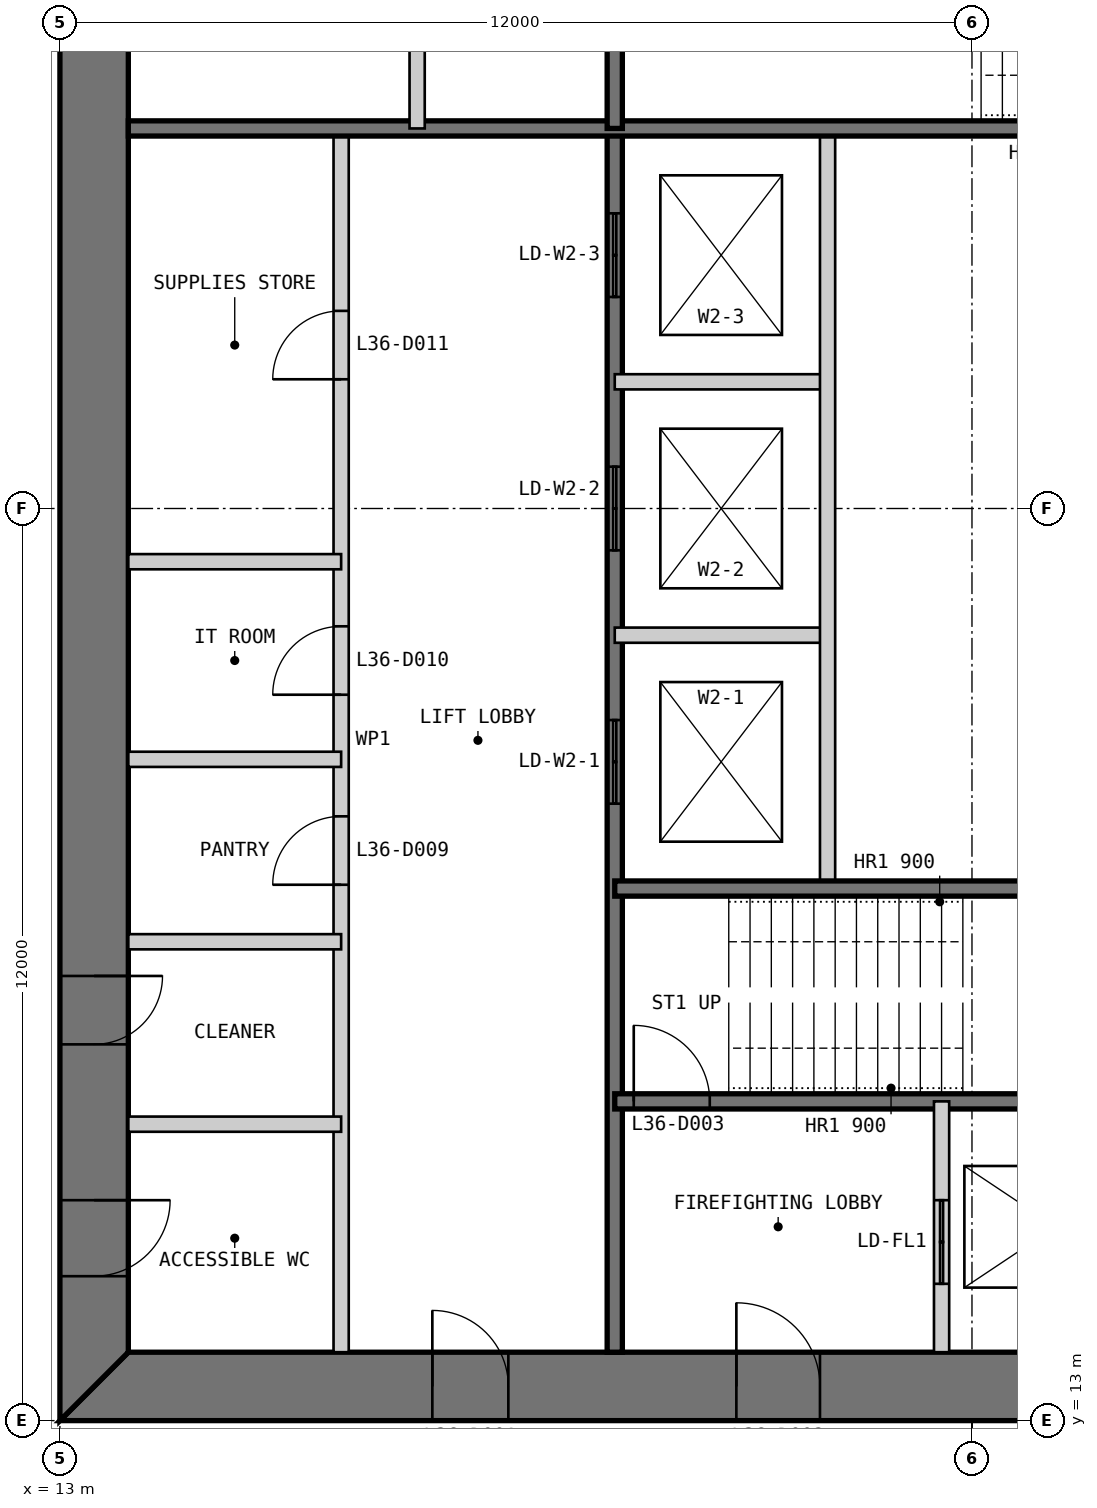
"""IFC4 building model, lengths in metres.
Left out: names, types, materials, properties, quantities, classifications, styles, units other than length and angle.
Written with IfcOpenShell. Run it as: python <this file> out.ifc"""

import sys

from ifc_helpers import new_model, si_unit, direction, frame, frame_2d, origin, place, context, subcontext, project, spatial, polyline, rectangle, outline, extrude, element, fill, save


model = new_model("IFC4")
c1 = context("Model", 3, precision=1e-05, world=origin(), true_north=direction((0.0, 1.0)))
c2 = subcontext(c1, "Body", "Model", "MODEL_VIEW")
j1 = project(units=[si_unit("LENGTHUNIT", "METRE"), si_unit("PLANEANGLEUNIT", "RADIAN")], contexts=[c1])
p1 = place(None, origin())
s1 = spatial("IfcSite", under=j1, at=p1, CompositionType="ELEMENT")
p2 = place(p1, origin())
s2 = spatial("IfcBuilding", under=s1, at=p2, CompositionType="ELEMENT")
p3 = place(p2, frame((0.0, 0.0, 154.4)))
s3 = spatial("IfcBuildingStorey", under=s2, at=p3, CompositionType="ELEMENT", Elevation=154.4)
p4 = place(p3, frame((13.0, 13.45, 0.0), z_axis=(0.0, 0.0, 1.0), x_axis=(1.0, 0.0, 0.0)))
e1 = element("IfcWall", 1, at=p4, inside=s3, PredefinedType="SHEAR", context=c2, shape_type="SweptSolid", body=[
    extrude(outline(polyline([(0.0, -0.45), (24.0, -0.45), (23.1, 0.45), (0.9, 0.45), (0.0, -0.45)])), origin(), (0.0, 0.0, 1.0), 4.0),
])
p5 = place(p4, frame((4.9, 0.0, 0.0)))
e2 = element("IfcOpeningElement", 2, at=p5, cuts=e1, PredefinedType="OPENING", context=c2, shape_type="SweptSolid", body=[
    extrude(rectangle(XDim=1.0, YDim=2.2, at=frame_2d((0.5, 1.1))), frame((0.0, 0.46, 0.0), z_axis=(0.0, -1.0, 0.0), x_axis=(1.0, 0.0, 0.0)), (0.0, 0.0, 1.0), 0.92),
])
p6 = place(p4, frame((8.9, 0.0, 0.0)))
e3 = element("IfcOpeningElement", 3, at=p6, cuts=e1, PredefinedType="OPENING", context=c2, shape_type="SweptSolid", body=[
    extrude(rectangle(XDim=1.1, YDim=2.2, at=frame_2d((0.55, 1.1))), frame((0.0, 0.46, 0.0), z_axis=(0.0, -1.0, 0.0), x_axis=(1.0, 0.0, 0.0)), (0.0, 0.0, 1.0), 0.92),
])
p7 = place(p4, frame((15.05, 0.0, 0.0)))
e4 = element("IfcOpeningElement", 4, at=p7, cuts=e1, PredefinedType="OPENING", context=c2, shape_type="SweptSolid", body=[
    extrude(rectangle(XDim=0.9, YDim=2.2, at=frame_2d((0.45, 1.1))), frame((0.0, 0.46, 0.0), z_axis=(0.0, -1.0, 0.0), x_axis=(1.0, 0.0, 0.0)), (0.0, 0.0, 1.0), 0.92),
])
p8 = place(p4, frame((17.9, 0.0, 0.0)))
e5 = element("IfcOpeningElement", 5, at=p8, cuts=e1, PredefinedType="OPENING", context=c2, shape_type="SweptSolid", body=[
    extrude(rectangle(XDim=1.0, YDim=2.2, at=frame_2d((0.5, 1.1))), frame((0.0, 0.46, 0.0), z_axis=(0.0, -1.0, 0.0), x_axis=(1.0, 0.0, 0.0)), (0.0, 0.0, 1.0), 0.92),
])
p9 = place(p4, frame((21.4, 0.0, 0.0)))
e6 = element("IfcOpeningElement", 6, at=p9, cuts=e1, PredefinedType="OPENING", context=c2, shape_type="SweptSolid", body=[
    extrude(rectangle(XDim=1.0, YDim=2.2, at=frame_2d((0.5, 1.1))), frame((0.0, 0.46, 0.0), z_axis=(0.0, -1.0, 0.0), x_axis=(1.0, 0.0, 0.0)), (0.0, 0.0, 1.0), 0.92),
])
p10 = place(p3, frame((13.45, 36.1, 0.0), z_axis=(0.0, 0.0, 1.0), x_axis=(0.0, -1.0, 0.0)))
e7 = element("IfcWall", 7, at=p10, inside=s3, PredefinedType="SHEAR", context=c2, shape_type="SweptSolid", body=[
    extrude(outline(polyline([(-0.9, -0.45), (23.1, -0.45), (22.2, 0.45), (0.0, 0.45), (-0.9, -0.45)])), origin(), (0.0, 0.0, 1.0), 4.0),
])
p11 = place(p10, frame((20.2, 0.0, 0.0)))
e8 = element("IfcOpeningElement", 8, at=p11, cuts=e7, PredefinedType="OPENING", context=c2, shape_type="SweptSolid", body=[
    extrude(rectangle(XDim=1.0, YDim=2.2, at=frame_2d((0.5, 1.1))), frame((0.0, 0.46, 0.0), z_axis=(0.0, -1.0, 0.0), x_axis=(1.0, 0.0, 0.0)), (0.0, 0.0, 1.0), 0.92),
])
p12 = place(p10, frame((17.25, 0.0, 0.0)))
e9 = element("IfcOpeningElement", 9, at=p12, cuts=e7, PredefinedType="OPENING", context=c2, shape_type="SweptSolid", body=[
    extrude(rectangle(XDim=0.9, YDim=2.2, at=frame_2d((0.45, 1.1))), frame((0.0, 0.46, 0.0), z_axis=(0.0, -1.0, 0.0), x_axis=(1.0, 0.0, 0.0)), (0.0, 0.0, 1.0), 0.92),
])
p13 = place(p3, frame((16.7, 13.9, 0.0), z_axis=(0.0, 0.0, 1.0), x_axis=(0.0, 1.0, 0.0)))
e10 = element("IfcWall", 10, at=p13, inside=s3, PredefinedType="PARTITIONING", context=c2, shape_type="SweptSolid", body=[
    extrude(rectangle(XDim=16.1, YDim=0.2, at=frame_2d((8.05, 0.0))), origin(), (0.0, 0.0, 1.0), 3.8),
])
p14 = place(p13, frame((6.15, 0.0, 0.0)))
e11 = element("IfcOpeningElement", 11, at=p14, cuts=e10, PredefinedType="OPENING", context=c2, shape_type="SweptSolid", body=[
    extrude(rectangle(XDim=0.9, YDim=2.2, at=frame_2d((0.45, 1.1))), frame((0.0, 0.11, 0.0), z_axis=(0.0, -1.0, 0.0), x_axis=(1.0, 0.0, 0.0)), (0.0, 0.0, 1.0), 0.22),
])
p15 = place(p13, frame((8.65, 0.0, 0.0)))
e12 = element("IfcOpeningElement", 12, at=p15, cuts=e10, PredefinedType="OPENING", context=c2, shape_type="SweptSolid", body=[
    extrude(rectangle(XDim=0.9, YDim=2.2, at=frame_2d((0.45, 1.1))), frame((0.0, 0.11, 0.0), z_axis=(0.0, -1.0, 0.0), x_axis=(1.0, 0.0, 0.0)), (0.0, 0.0, 1.0), 0.22),
])
p16 = place(p13, frame((12.8, 0.0, 0.0)))
e13 = element("IfcOpeningElement", 13, at=p16, cuts=e10, PredefinedType="OPENING", context=c2, shape_type="SweptSolid", body=[
    extrude(rectangle(XDim=0.9, YDim=2.2, at=frame_2d((0.45, 1.1))), frame((0.0, 0.11, 0.0), z_axis=(0.0, -1.0, 0.0), x_axis=(1.0, 0.0, 0.0)), (0.0, 0.0, 1.0), 0.22),
])
p17 = place(p3, frame((20.3, 13.9, 0.0), z_axis=(0.0, 0.0, 1.0), x_axis=(0.0, 1.0, 0.0)))
e14 = element("IfcWall", 14, at=p17, inside=s3, PredefinedType="SOLIDWALL", context=c2, shape_type="SweptSolid", body=[
    extrude(rectangle(XDim=16.1, YDim=0.2, at=frame_2d((8.05, 0.0))), origin(), (0.0, 0.0, 1.0), 3.8),
])
p18 = place(p17, frame((7.217, 0.0, 0.0)))
e15 = element("IfcOpeningElement", 15, at=p18, cuts=e14, PredefinedType="OPENING", context=c2, shape_type="SweptSolid", body=[
    extrude(rectangle(XDim=1.1, YDim=2.2, at=frame_2d((0.55, 1.1))), frame((0.0, 0.11, 0.0), z_axis=(0.0, -1.0, 0.0), x_axis=(1.0, 0.0, 0.0)), (0.0, 0.0, 1.0), 0.22),
])
p19 = place(p17, frame((10.55, 0.0, 0.0)))
e16 = element("IfcOpeningElement", 16, at=p19, cuts=e14, PredefinedType="OPENING", context=c2, shape_type="SweptSolid", body=[
    extrude(rectangle(XDim=1.1, YDim=2.2, at=frame_2d((0.55, 1.1))), frame((0.0, 0.11, 0.0), z_axis=(0.0, -1.0, 0.0), x_axis=(1.0, 0.0, 0.0)), (0.0, 0.0, 1.0), 0.22),
])
p20 = place(p17, frame((13.883, 0.0, 0.0)))
e17 = element("IfcOpeningElement", 17, at=p20, cuts=e14, PredefinedType="OPENING", context=c2, shape_type="SweptSolid", body=[
    extrude(rectangle(XDim=1.1, YDim=2.2, at=frame_2d((0.55, 1.1))), frame((0.0, 0.11, 0.0), z_axis=(0.0, -1.0, 0.0), x_axis=(1.0, 0.0, 0.0)), (0.0, 0.0, 1.0), 0.22),
])
for number, where, z_axis, x_axis in (
    (18, (20.3, 23.333, 0.0), (0.0, 0.0, 1.0), (1.0, 0.0, 0.0)),
    (19, (20.3, 26.667, 0.0), (0.0, 0.0, 1.0), (1.0, 0.0, 0.0)),
):
    element("IfcWall", number, at=place(p3, frame(where, z_axis=z_axis, x_axis=x_axis)), inside=s3, PredefinedType="PARTITIONING", context=c2, shape_type="SweptSolid", body=[
        extrude(rectangle(XDim=2.8, YDim=0.2, at=frame_2d((1.4, 0.0))), origin(), (0.0, 0.0, 1.0), 3.8),
    ])
p21 = place(p3, frame((23.1, 20.0, 0.0), z_axis=(0.0, 0.0, 1.0), x_axis=(0.0, 1.0, 0.0)))
e20 = element("IfcWall", 20, at=p21, inside=s3, PredefinedType="PARTITIONING", context=c2, shape_type="SweptSolid", body=[
    extrude(rectangle(XDim=10.0, YDim=0.2, at=frame_2d((5.0, 0.0))), origin(), (0.0, 0.0, 1.0), 3.8),
])
p22 = place(p3, frame((20.3, 17.2, 0.0), z_axis=(0.0, 0.0, 1.0), x_axis=(1.0, 0.0, 0.0)))
e21 = element("IfcWall", 21, at=p22, inside=s3, PredefinedType="SOLIDWALL", context=c2, shape_type="SweptSolid", body=[
    extrude(rectangle(XDim=9.4, YDim=0.2, at=frame_2d((4.7, 0.0))), origin(), (0.0, 0.0, 1.0), 3.8),
])
p23 = place(p22, frame((0.25, 0.0, 0.0)))
e22 = element("IfcOpeningElement", 22, at=p23, cuts=e21, PredefinedType="OPENING", context=c2, shape_type="SweptSolid", body=[
    extrude(rectangle(XDim=1.0, YDim=2.2, at=frame_2d((0.5, 1.1))), frame((0.0, 0.11, 0.0), z_axis=(0.0, -1.0, 0.0), x_axis=(1.0, 0.0, 0.0)), (0.0, 0.0, 1.0), 0.22),
])
p24 = place(p3, frame((20.3, 20.0, 0.0), z_axis=(0.0, 0.0, 1.0), x_axis=(1.0, 0.0, 0.0)))
e23 = element("IfcWall", 23, at=p24, inside=s3, PredefinedType="SOLIDWALL", context=c2, shape_type="SweptSolid", body=[
    extrude(rectangle(XDim=15.8, YDim=0.2, at=frame_2d((7.9, 0.0))), origin(), (0.0, 0.0, 1.0), 3.8),
])
p25 = place(p3, frame((24.6, 13.9, 0.0), z_axis=(0.0, 0.0, 1.0), x_axis=(0.0, 1.0, 0.0)))
e24 = element("IfcWall", 24, at=p25, inside=s3, PredefinedType="PARTITIONING", context=c2, shape_type="SweptSolid", body=[
    extrude(rectangle(XDim=3.3, YDim=0.2, at=frame_2d((1.65, 0.0))), origin(), (0.0, 0.0, 1.0), 3.8),
])
p26 = place(p25, frame((0.9, 0.0, 0.0)))
e25 = element("IfcOpeningElement", 25, at=p26, cuts=e24, PredefinedType="OPENING", context=c2, shape_type="SweptSolid", body=[
    extrude(rectangle(XDim=1.1, YDim=2.2, at=frame_2d((0.55, 1.1))), frame((0.0, 0.11, 0.0), z_axis=(0.0, -1.0, 0.0), x_axis=(1.0, 0.0, 0.0)), (0.0, 0.0, 1.0), 0.22),
])
for number, where, z_axis, x_axis in (
    (26, (13.9, 16.9, 0.0), (0.0, 0.0, 1.0), (1.0, 0.0, 0.0)),
    (27, (13.9, 19.3, 0.0), (0.0, 0.0, 1.0), (1.0, 0.0, 0.0)),
    (28, (13.9, 21.7, 0.0), (0.0, 0.0, 1.0), (1.0, 0.0, 0.0)),
    (29, (13.9, 24.3, 0.0), (0.0, 0.0, 1.0), (1.0, 0.0, 0.0)),
):
    element("IfcWall", number, at=place(p3, frame(where, z_axis=z_axis, x_axis=x_axis)), inside=s3, PredefinedType="PARTITIONING", context=c2, shape_type="SweptSolid", body=[
        extrude(rectangle(XDim=2.8, YDim=0.2, at=frame_2d((1.4, 0.0))), origin(), (0.0, 0.0, 1.0), 3.8),
    ])
p27 = place(p3, frame((29.7, 30.0, 0.0), z_axis=(0.0, 0.0, 1.0), x_axis=(-1.0, 0.0, 0.0)))
e30 = element("IfcWall", 30, at=p27, inside=s3, PredefinedType="SOLIDWALL", context=c2, shape_type="SweptSolid", body=[
    extrude(rectangle(XDim=15.8, YDim=0.2, at=frame_2d((7.9, 0.0))), origin(), (0.0, 0.0, 1.0), 3.8),
])
p28 = place(p3, frame((20.3, 36.1, 0.0), z_axis=(0.0, 0.0, 1.0), x_axis=(0.0, -1.0, 0.0)))
e31 = element("IfcWall", 31, at=p28, inside=s3, PredefinedType="SOLIDWALL", context=c2, shape_type="SweptSolid", body=[
    extrude(rectangle(XDim=6.1, YDim=0.2, at=frame_2d((3.05, 0.0))), origin(), (0.0, 0.0, 1.0), 3.8),
])
p29 = place(p3, frame((17.7, 36.1, 0.0), z_axis=(0.0, 0.0, 1.0), x_axis=(0.0, -1.0, 0.0)))
e32 = element("IfcWall", 32, at=p29, inside=s3, PredefinedType="PARTITIONING", context=c2, shape_type="SweptSolid", body=[
    extrude(rectangle(XDim=6.1, YDim=0.2, at=frame_2d((3.05, 0.0))), origin(), (0.0, 0.0, 1.0), 3.8),
])
p30 = place(p5, origin())
e33 = element("IfcDoor", 33, at=p30, inside=s3, OperationType="SINGLE_SWING_LEFT", PredefinedType="DOOR", context=c2, shape_type="SweptSolid", body=[
    extrude(rectangle(XDim=1.0, YDim=2.2, at=frame_2d((0.5, 1.1))), frame((0.0, 0.025, 0.0), z_axis=(0.0, -1.0, 0.0), x_axis=(1.0, 0.0, 0.0)), (0.0, 0.0, 1.0), 0.05),
    extrude(outline(polyline([(0.0, 0.0), (0.04, 0.0), (0.04, 2.16), (0.96, 2.16), (0.96, 0.0), (1.0, 0.0), (1.0, 2.2), (0.0, 2.2), (0.0, 0.0)])), frame((0.0, 0.3, 0.0), z_axis=(0.0, -1.0, 0.0), x_axis=(1.0, 0.0, 0.0)), (0.0, 0.0, 1.0), 0.6),
])
fill(e2, e33)
p31 = place(p6, origin())
e34 = element("IfcDoor", 34, at=p31, inside=s3, OperationType="SINGLE_SWING_LEFT", PredefinedType="DOOR", context=c2, shape_type="SweptSolid", body=[
    extrude(rectangle(XDim=1.1, YDim=2.2, at=frame_2d((0.55, 1.1))), frame((0.0, 0.025, 0.0), z_axis=(0.0, -1.0, 0.0), x_axis=(1.0, 0.0, 0.0)), (0.0, 0.0, 1.0), 0.05),
    extrude(outline(polyline([(0.0, 0.0), (0.04, 0.0), (0.04, 2.16), (1.06, 2.16), (1.06, 0.0), (1.1, 0.0), (1.1, 2.2), (0.0, 2.2), (0.0, 0.0)])), frame((0.0, 0.3, 0.0), z_axis=(0.0, -1.0, 0.0), x_axis=(1.0, 0.0, 0.0)), (0.0, 0.0, 1.0), 0.6),
])
fill(e3, e34)
p32 = place(p23, origin())
e35 = element("IfcDoor", 35, at=p32, inside=s3, OperationType="SINGLE_SWING_LEFT", PredefinedType="DOOR", context=c2, shape_type="SweptSolid", body=[
    extrude(rectangle(XDim=1.0, YDim=2.2, at=frame_2d((0.5, 1.1))), frame((0.0, 0.025, 0.0), z_axis=(0.0, -1.0, 0.0), x_axis=(1.0, 0.0, 0.0)), (0.0, 0.0, 1.0), 0.05),
])
fill(e22, e35)
p33 = place(p11, origin())
e36 = element("IfcDoor", 36, at=p33, inside=s3, OperationType="SINGLE_SWING_LEFT", PredefinedType="DOOR", context=c2, shape_type="SweptSolid", body=[
    extrude(rectangle(XDim=1.0, YDim=2.2, at=frame_2d((0.5, 1.1))), frame((0.0, 0.025, 0.0), z_axis=(0.0, -1.0, 0.0), x_axis=(1.0, 0.0, 0.0)), (0.0, 0.0, 1.0), 0.05),
    extrude(outline(polyline([(0.0, 0.0), (0.04, 0.0), (0.04, 2.16), (0.96, 2.16), (0.96, 0.0), (1.0, 0.0), (1.0, 2.2), (0.0, 2.2), (0.0, 0.0)])), frame((0.0, 0.3, 0.0), z_axis=(0.0, -1.0, 0.0), x_axis=(1.0, 0.0, 0.0)), (0.0, 0.0, 1.0), 0.6),
])
fill(e8, e36)
p34 = place(p12, origin())
e37 = element("IfcDoor", 37, at=p34, inside=s3, OperationType="SINGLE_SWING_LEFT", PredefinedType="DOOR", context=c2, shape_type="SweptSolid", body=[
    extrude(rectangle(XDim=0.9, YDim=2.2, at=frame_2d((0.45, 1.1))), frame((0.0, 0.025, 0.0), z_axis=(0.0, -1.0, 0.0), x_axis=(1.0, 0.0, 0.0)), (0.0, 0.0, 1.0), 0.05),
    extrude(outline(polyline([(0.0, 0.0), (0.04, 0.0), (0.04, 2.16), (0.86, 2.16), (0.86, 0.0), (0.9, 0.0), (0.9, 2.2), (0.0, 2.2), (0.0, 0.0)])), frame((0.0, 0.3, 0.0), z_axis=(0.0, -1.0, 0.0), x_axis=(1.0, 0.0, 0.0)), (0.0, 0.0, 1.0), 0.6),
])
fill(e9, e37)
p35 = place(p14, origin())
e38 = element("IfcDoor", 38, at=p35, inside=s3, OperationType="SINGLE_SWING_LEFT", PredefinedType="DOOR", context=c2, shape_type="SweptSolid", body=[
    extrude(rectangle(XDim=0.9, YDim=2.2, at=frame_2d((0.45, 1.1))), frame((0.0, 0.025, 0.0), z_axis=(0.0, -1.0, 0.0), x_axis=(1.0, 0.0, 0.0)), (0.0, 0.0, 1.0), 0.05),
])
fill(e11, e38)
p36 = place(p15, origin())
e39 = element("IfcDoor", 39, at=p36, inside=s3, OperationType="SINGLE_SWING_LEFT", PredefinedType="DOOR", context=c2, shape_type="SweptSolid", body=[
    extrude(rectangle(XDim=0.9, YDim=2.2, at=frame_2d((0.45, 1.1))), frame((0.0, 0.025, 0.0), z_axis=(0.0, -1.0, 0.0), x_axis=(1.0, 0.0, 0.0)), (0.0, 0.0, 1.0), 0.05),
])
fill(e12, e39)
p37 = place(p16, origin())
e40 = element("IfcDoor", 40, at=p37, inside=s3, OperationType="SINGLE_SWING_LEFT", PredefinedType="DOOR", context=c2, shape_type="SweptSolid", body=[
    extrude(rectangle(XDim=0.9, YDim=2.2, at=frame_2d((0.45, 1.1))), frame((0.0, 0.025, 0.0), z_axis=(0.0, -1.0, 0.0), x_axis=(1.0, 0.0, 0.0)), (0.0, 0.0, 1.0), 0.05),
])
fill(e13, e40)
p38 = place(p26, origin())
e41 = element("IfcDoor", 41, at=p38, inside=s3, OperationType="DOUBLE_DOOR_SLIDING", PredefinedType="DOOR", context=c2, shape_type="SweptSolid", body=[
    extrude(rectangle(XDim=1.1, YDim=2.2, at=frame_2d((0.55, 1.1))), frame((0.0, 0.025, 0.0), z_axis=(0.0, -1.0, 0.0), x_axis=(1.0, 0.0, 0.0)), (0.0, 0.0, 1.0), 0.05),
])
fill(e25, e41)
p39 = place(p18, origin())
e42 = element("IfcDoor", 42, at=p39, inside=s3, OperationType="DOUBLE_DOOR_SLIDING", PredefinedType="DOOR", context=c2, shape_type="SweptSolid", body=[
    extrude(rectangle(XDim=1.1, YDim=2.2, at=frame_2d((0.55, 1.1))), frame((0.0, 0.025, 0.0), z_axis=(0.0, -1.0, 0.0), x_axis=(1.0, 0.0, 0.0)), (0.0, 0.0, 1.0), 0.05),
])
fill(e15, e42)
p40 = place(p19, origin())
e43 = element("IfcDoor", 43, at=p40, inside=s3, OperationType="DOUBLE_DOOR_SLIDING", PredefinedType="DOOR", context=c2, shape_type="SweptSolid", body=[
    extrude(rectangle(XDim=1.1, YDim=2.2, at=frame_2d((0.55, 1.1))), frame((0.0, 0.025, 0.0), z_axis=(0.0, -1.0, 0.0), x_axis=(1.0, 0.0, 0.0)), (0.0, 0.0, 1.0), 0.05),
])
fill(e16, e43)
p41 = place(p20, origin())
e44 = element("IfcDoor", 44, at=p41, inside=s3, OperationType="DOUBLE_DOOR_SLIDING", PredefinedType="DOOR", context=c2, shape_type="SweptSolid", body=[
    extrude(rectangle(XDim=1.1, YDim=2.2, at=frame_2d((0.55, 1.1))), frame((0.0, 0.025, 0.0), z_axis=(0.0, -1.0, 0.0), x_axis=(1.0, 0.0, 0.0)), (0.0, 0.0, 1.0), 0.05),
])
fill(e17, e44)
save(model, sys.argv[1])
